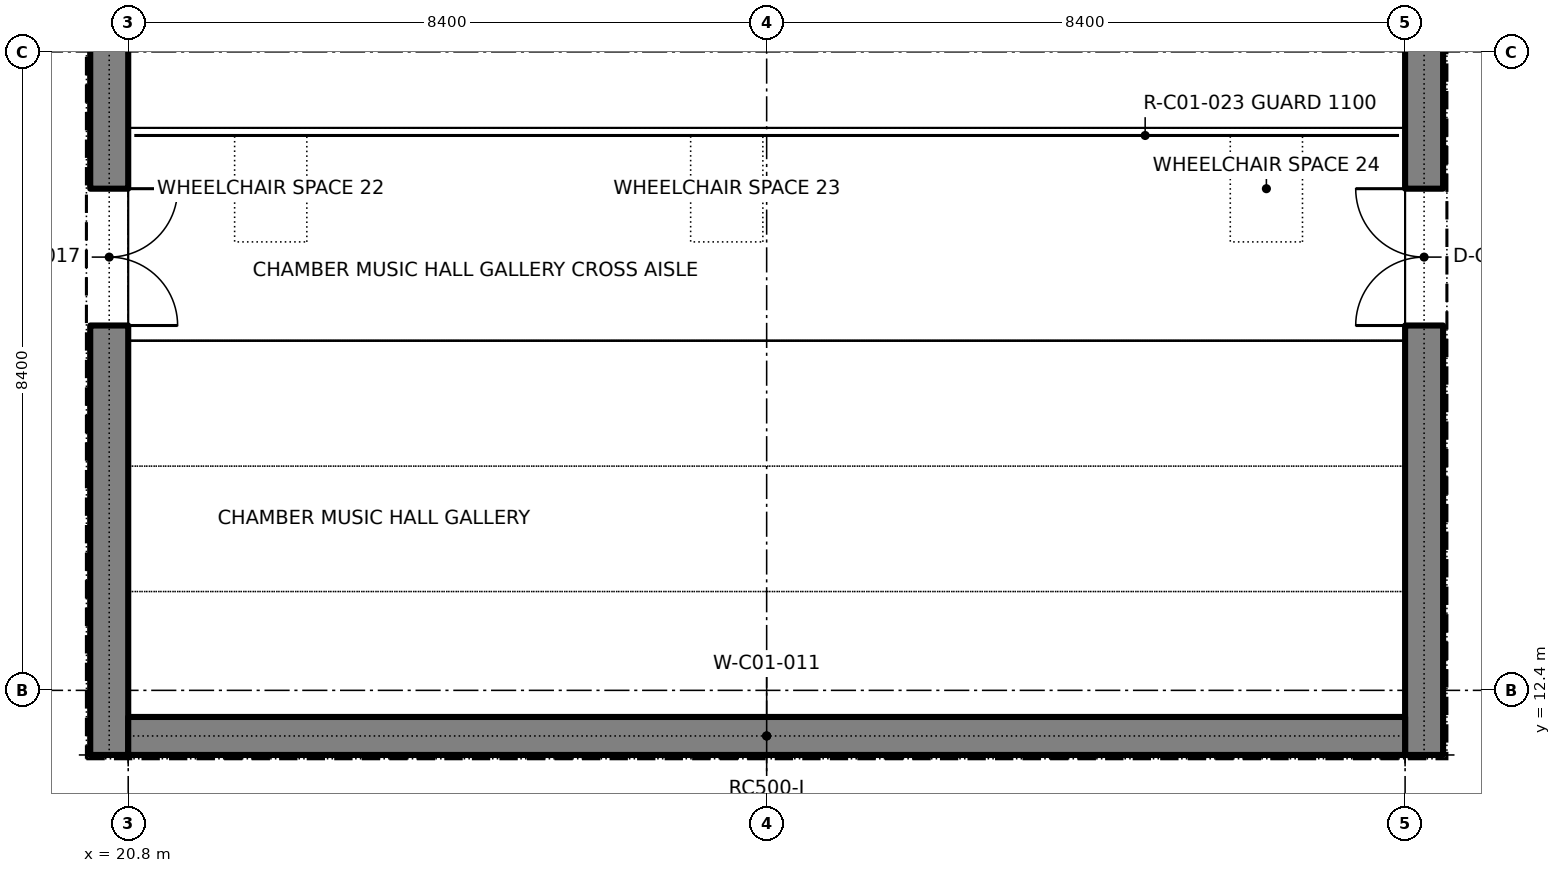
"""IFC4 building model, lengths in metres.
Left out: names, types, materials, properties, quantities, classifications, styles, units other than length and angle.
Written with IfcOpenShell. Run it as: python <this file> out.ifc"""

import sys

from ifc_helpers import new_model, si_unit, direction, frame, frame_2d, origin, place, context, subcontext, project, spatial, rectangle, extrude, element, fill, save


model = new_model("IFC4")
c1 = context("Model", 3, precision=1e-05, world=origin(), true_north=direction((0.0, 1.0)))
c2 = subcontext(c1, "Body", "Model", "MODEL_VIEW")
j1 = project(units=[si_unit("LENGTHUNIT", "METRE"), si_unit("PLANEANGLEUNIT", "RADIAN")], contexts=[c1])
p1 = place(None, origin())
s1 = spatial("IfcSite", under=j1, at=p1, CompositionType="ELEMENT")
p2 = place(p1, origin())
s2 = spatial("IfcBuilding", under=s1, at=p2, CompositionType="ELEMENT")
p3 = place(p2, frame((0.0, 0.0, 5.4)))
s3 = spatial("IfcBuildingStorey", under=s2, at=p3, CompositionType="ELEMENT", Elevation=5.4)
p4 = place(p3, frame((20.55, 11.55, 0.0), z_axis=(0.0, 0.0, 1.0), x_axis=(0.0, 1.0, 0.0)))
e1 = element("IfcWall", 1, at=p4, inside=s3, PredefinedType="SOLIDWALL", context=c2, shape_type="SweptSolid", body=[
    extrude(rectangle(XDim=29.0, YDim=0.5, at=frame_2d((14.5, 0.0))), origin(), (0.0, 0.0, 1.0), 4.8),
])
p5 = place(p4, frame((5.65, 0.0, 0.0)))
e2 = element("IfcOpeningElement", 2, at=p5, cuts=e1, PredefinedType="OPENING", context=c2, shape_type="SweptSolid", body=[
    extrude(rectangle(XDim=1.8, YDim=2.1, at=frame_2d((0.9, 1.05))), frame((0.0, 0.26, 0.0), z_axis=(0.0, -1.0, 0.0), x_axis=(1.0, 0.0, 0.0)), (0.0, 0.0, 1.0), 0.52),
])
p6 = place(p3, frame((37.85, 11.55, 0.0), z_axis=(0.0, 0.0, 1.0), x_axis=(0.0, 1.0, 0.0)))
e3 = element("IfcWall", 3, at=p6, inside=s3, PredefinedType="SOLIDWALL", context=c2, shape_type="SweptSolid", body=[
    extrude(rectangle(XDim=29.0, YDim=0.5, at=frame_2d((14.5, 0.0))), origin(), (0.0, 0.0, 1.0), 4.8),
])
p7 = place(p6, frame((5.65, 0.0, 0.0)))
e4 = element("IfcOpeningElement", 4, at=p7, cuts=e3, PredefinedType="OPENING", context=c2, shape_type="SweptSolid", body=[
    extrude(rectangle(XDim=1.8, YDim=2.1, at=frame_2d((0.9, 1.05))), frame((0.0, 0.26, 0.0), z_axis=(0.0, -1.0, 0.0), x_axis=(1.0, 0.0, 0.0)), (0.0, 0.0, 1.0), 0.52),
])
p8 = place(p3, frame((20.8, 11.8, 0.0), z_axis=(0.0, 0.0, 1.0), x_axis=(1.0, 0.0, 0.0)))
e5 = element("IfcWall", 5, at=p8, inside=s3, PredefinedType="SOLIDWALL", context=c2, shape_type="SweptSolid", body=[
    extrude(rectangle(XDim=16.8, YDim=0.5, at=frame_2d((8.4, 0.0))), origin(), (0.0, 0.0, 1.0), 4.8),
])
p9 = place(p5, frame((1.8, 0.0, 0.0), z_axis=(0.0, 0.0, 1.0), x_axis=(-1.0, 0.0, 0.0)))
e6 = element("IfcDoor", 6, at=p9, inside=s3, OperationType="DOUBLE_DOOR_SINGLE_SWING", PredefinedType="DOOR", context=c2, shape_type="SweptSolid", body=[
    extrude(rectangle(XDim=1.8, YDim=2.1, at=frame_2d((0.9, 1.05))), frame((0.0, 0.025, 0.0), z_axis=(0.0, -1.0, 0.0), x_axis=(1.0, 0.0, 0.0)), (0.0, 0.0, 1.0), 0.05),
])
fill(e2, e6)
p10 = place(p7, origin())
e7 = element("IfcDoor", 7, at=p10, inside=s3, OperationType="DOUBLE_DOOR_SINGLE_SWING", PredefinedType="DOOR", context=c2, shape_type="SweptSolid", body=[
    extrude(rectangle(XDim=1.8, YDim=2.1, at=frame_2d((0.9, 1.05))), frame((0.0, 0.025, 0.0), z_axis=(0.0, -1.0, 0.0), x_axis=(1.0, 0.0, 0.0)), (0.0, 0.0, 1.0), 0.05),
])
fill(e4, e7)
save(model, sys.argv[1])
